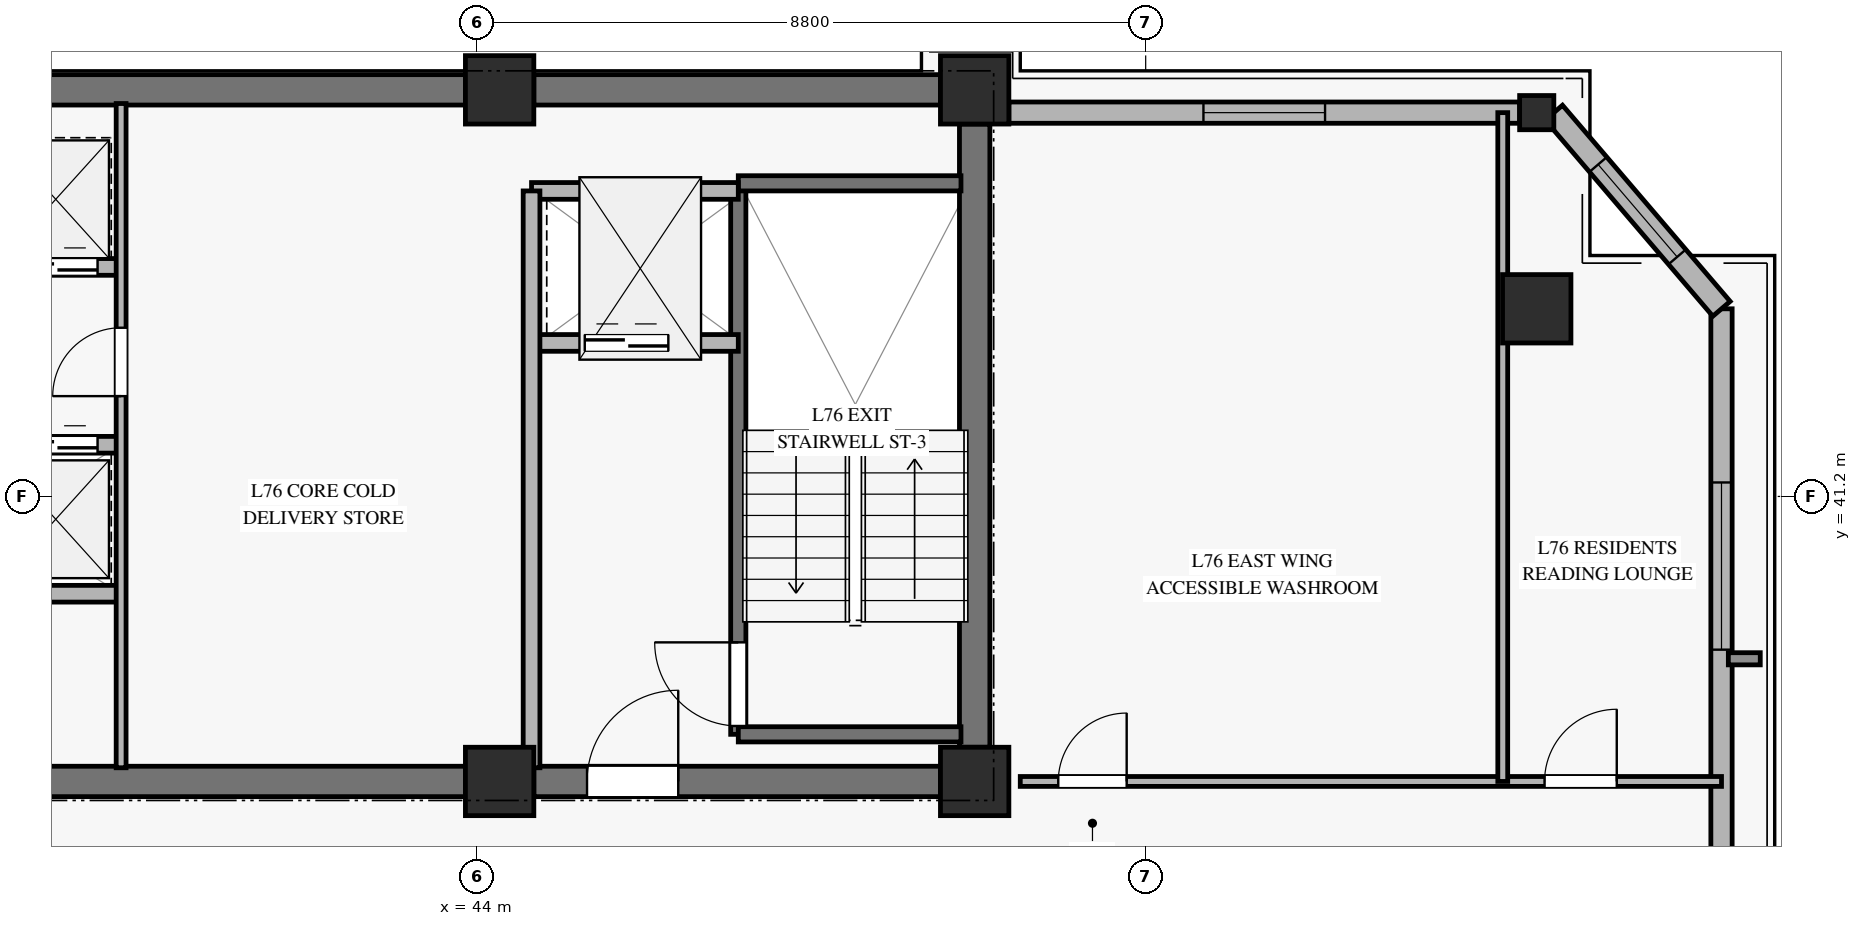
"""IFC4 building model, lengths in metres.
Left out: names, types, materials, properties, quantities, classifications, styles, units other than length and angle.
Written with IfcOpenShell. Run it as: python <this file> out.ifc"""

import sys

from ifc_helpers import new_model, si_unit, direction, frame, frame_2d, origin, origin_2d, place, context, subcontext, project, spatial, rectangle, hollow_rectangle, extrude, source, transform, mapped, element, fill, save


model = new_model("IFC4")
c1 = context("Model", 3, precision=1e-05, world=origin(), true_north=direction((0.0, 1.0)))
c2 = subcontext(c1, "Body", "Model", "MODEL_VIEW")
j1 = project(units=[si_unit("LENGTHUNIT", "METRE"), si_unit("PLANEANGLEUNIT", "RADIAN")], contexts=[c1])
p1 = place(None, origin())
s1 = spatial("IfcSite", under=j1, at=p1, CompositionType="ELEMENT")
p2 = place(p1, origin())
s2 = spatial("IfcBuilding", under=s1, at=p2, CompositionType="ELEMENT")
p3 = place(p2, frame((0.0, 0.0, 297.2)))
s3 = spatial("IfcBuildingStorey", under=s2, at=p3, CompositionType="ELEMENT", Elevation=297.2)
m1 = source(origin(), c2, "Body", "SweptSolid", [
    extrude(rectangle(XDim=0.9, YDim=0.9, at=origin_2d()), origin(), (0.0, 0.0, 1.0), 3.185),
])
for number, where, z_axis, x_axis in (
    (1, (44.3, 37.45, 0.0), (0.0, 0.0, 1.0), (1.0, 0.0, 0.0)),
    (2, (44.3, 46.55, 0.0), (0.0, 0.0, 1.0), (1.0, 0.0, 0.0)),
    (3, (50.55, 37.45, 0.0), (0.0, 0.0, 1.0), (1.0, 0.0, 0.0)),
    (4, (50.55, 46.55, 0.0), (0.0, 0.0, 1.0), (1.0, 0.0, 0.0)),
):
    element("IfcColumn", number, at=place(p3, frame(where, z_axis=z_axis, x_axis=x_axis)), inside=s3, PredefinedType="PILASTER", context=c2, shape_type="MappedRepresentation", body=[
        mapped(m1, transform((0.0, 0.0, 0.0), x_axis=(1.0, 0.0, 0.0), y_axis=(0.0, 1.0, 0.0), z_axis=(0.0, 0.0, 1.0), scale=1.0)),
    ])
p4 = place(p3, frame((36.05, 46.55, 0.0), z_axis=(0.0, 0.0, 1.0), x_axis=(1.0, 0.0, 0.0)))
e5 = element("IfcWall", 5, at=p4, inside=s3, PredefinedType="SHEAR", context=c2, shape_type="SweptSolid", body=[
    extrude(rectangle(XDim=7.8, YDim=0.4, at=frame_2d((3.9, 0.0))), origin(), (0.0, 0.0, 1.0), 3.185),
])
p5 = place(p3, frame((44.75, 46.55, 0.0), z_axis=(0.0, 0.0, 1.0), x_axis=(1.0, 0.0, 0.0)))
e6 = element("IfcWall", 6, at=p5, inside=s3, PredefinedType="SHEAR", context=c2, shape_type="SweptSolid", body=[
    extrude(rectangle(XDim=5.35, YDim=0.4, at=frame_2d((2.675, 0.0))), origin(), (0.0, 0.0, 1.0), 3.185),
])
p6 = place(p3, frame((36.05, 37.45, 0.0), z_axis=(0.0, 0.0, 1.0), x_axis=(1.0, 0.0, 0.0)))
e7 = element("IfcWall", 7, at=p6, inside=s3, PredefinedType="SHEAR", context=c2, shape_type="SweptSolid", body=[
    extrude(rectangle(XDim=7.8, YDim=0.4, at=frame_2d((3.9, 0.0))), origin(), (0.0, 0.0, 1.0), 3.185),
])
p7 = place(p3, frame((44.75, 37.45, 0.0), z_axis=(0.0, 0.0, 1.0), x_axis=(1.0, 0.0, 0.0)))
e8 = element("IfcWall", 8, at=p7, inside=s3, PredefinedType="SHEAR", context=c2, shape_type="SweptSolid", body=[
    extrude(rectangle(XDim=5.35, YDim=0.4, at=frame_2d((2.675, 0.0))), origin(), (0.0, 0.0, 1.0), 3.185),
])
p8 = place(p7, frame((0.7, 0.0, 0.0)))
e9 = element("IfcOpeningElement", 9, at=p8, cuts=e8, PredefinedType="OPENING", context=c2, shape_type="SweptSolid", body=[
    extrude(rectangle(XDim=1.2, YDim=2.15, at=frame_2d((0.6, 1.075))), frame((0.0, 0.21, 0.0), z_axis=(0.0, -1.0, 0.0), x_axis=(1.0, 0.0, 0.0)), (0.0, 0.0, 1.0), 0.42),
])
p9 = place(p3, frame((50.55, 37.9, 0.0), z_axis=(0.0, 0.0, 1.0), x_axis=(0.0, 1.0, 0.0)))
e10 = element("IfcWall", 10, at=p9, inside=s3, PredefinedType="SHEAR", context=c2, shape_type="SweptSolid", body=[
    extrude(rectangle(XDim=8.2, YDim=0.4, at=frame_2d((4.1, 0.0))), origin(), (0.0, 0.0, 1.0), 3.185),
])
m2 = source(origin(), c2, "Body", "SweptSolid", [
    extrude(hollow_rectangle(XDim=0.9, YDim=0.9, WallThickness=0.04, at=origin_2d()), origin(), (0.0, 0.0, 1.0), 3.185),
])
p10 = place(p3, frame((57.945, 43.669, 0.0), z_axis=(0.0, 0.0, 1.0), x_axis=(1.0, 0.0, 0.0)))
e11 = element("IfcColumn", 11, at=p10, inside=s3, PredefinedType="COLUMN", context=c2, shape_type="MappedRepresentation", body=[
    mapped(m2, transform((0.0, 0.0, 0.0), x_axis=(1.0, 0.0, 0.0), y_axis=(0.0, 1.0, 0.0), z_axis=(0.0, 0.0, 1.0), scale=1.0)),
])
m3 = source(origin(), c2, "Body", "SweptSolid", [
    extrude(hollow_rectangle(XDim=0.45, YDim=0.45, WallThickness=0.022, at=origin_2d()), origin(), (0.0, 0.0, 1.0), 3.185),
])
p11 = place(p3, frame((57.945, 46.25, 0.0), z_axis=(0.0, 0.0, 1.0), x_axis=(1.0, 0.0, 0.0)))
e12 = element("IfcColumn", 12, at=p11, inside=s3, PredefinedType="COLUMN", context=c2, shape_type="MappedRepresentation", body=[
    mapped(m3, transform((0.0, 0.0, 0.0), x_axis=(1.0, 0.0, 0.0), y_axis=(0.0, 1.0, 0.0), z_axis=(0.0, 0.0, 1.0), scale=1.0)),
])
p12 = place(p3, frame((60.376, 32.696, 0.0), z_axis=(0.0, 0.0, 1.0), x_axis=(0.0, 1.0, 0.0)))
e13 = element("IfcWall", 13, at=p12, inside=s3, PredefinedType="SOLIDWALL", context=c2, shape_type="SweptSolid", body=[
    extrude(rectangle(XDim=10.973, YDim=0.28, at=frame_2d((5.486, 0.0))), origin(), (0.0, 0.0, 1.0), 2.815),
])
p13 = place(p12, frame((6.488, 0.0, 0.45)))
e14 = element("IfcOpeningElement", 14, at=p13, cuts=e13, PredefinedType="OPENING", context=c2, shape_type="SweptSolid", body=[
    extrude(rectangle(XDim=2.2, YDim=2.1, at=frame_2d((1.1, 1.05))), frame((0.0, 0.15, 0.0), z_axis=(0.0, -1.0, 0.0), x_axis=(1.0, 0.0, 0.0)), (0.0, 0.0, 1.0), 0.3),
])
p14 = place(p3, frame((51.0, 46.25, 0.0), z_axis=(0.0, 0.0, 1.0), x_axis=(1.0, 0.0, 0.0)))
e15 = element("IfcWall", 15, at=p14, inside=s3, PredefinedType="SOLIDWALL", context=c2, shape_type="SweptSolid", body=[
    extrude(rectangle(XDim=6.72, YDim=0.28, at=frame_2d((3.36, 0.0))), origin(), (0.0, 0.0, 1.0), 2.815),
])
p15 = place(p14, frame((2.56, 0.0, 0.45)))
e16 = element("IfcOpeningElement", 16, at=p15, cuts=e15, PredefinedType="OPENING", context=c2, shape_type="SweptSolid", body=[
    extrude(rectangle(XDim=1.6, YDim=2.0, at=frame_2d((0.8, 1.0))), frame((0.0, 0.15, 0.0), z_axis=(0.0, -1.0, 0.0), x_axis=(1.0, 0.0, 0.0)), (0.0, 0.0, 1.0), 0.3),
])
p16 = place(p3, frame((60.376, 43.669, 0.0), z_axis=(0.0, 0.0, 1.0), x_axis=(-0.649724860602, 0.76016945842, 0.0)))
e17 = element("IfcWall", 17, at=p16, inside=s3, PredefinedType="SOLIDWALL", context=c2, shape_type="SweptSolid", body=[
    extrude(rectangle(XDim=3.395, YDim=0.3, at=frame_2d((1.698, 0.0))), origin(), (0.0, 0.0, 1.0), 2.815),
])
p17 = place(p16, frame((0.898, 0.0, 0.45)))
e18 = element("IfcOpeningElement", 18, at=p17, cuts=e17, PredefinedType="OPENING", context=c2, shape_type="SweptSolid", body=[
    extrude(rectangle(XDim=1.6, YDim=2.0, at=frame_2d((0.8, 1.0))), frame((0.0, 0.16, 0.0), z_axis=(0.0, -1.0, 0.0), x_axis=(1.0, 0.0, 0.0)), (0.0, 0.0, 1.0), 0.32),
])
p18 = place(p3, frame((47.44, 38.07, 0.0), z_axis=(0.0, 0.0, 1.0), x_axis=(0.0, 1.0, 0.0)))
e19 = element("IfcWall", 19, at=p18, inside=s3, PredefinedType="SOLIDWALL", context=c2, shape_type="SweptSolid", body=[
    extrude(rectangle(XDim=7.25, YDim=0.2, at=frame_2d((3.625, 0.0))), origin(), (0.0, 0.0, 1.0), 3.4),
])
p19 = place(p18, frame((0.11, 0.0, 0.0)))
e20 = element("IfcOpeningElement", 20, at=p19, cuts=e19, PredefinedType="OPENING", context=c2, shape_type="SweptSolid", body=[
    extrude(rectangle(XDim=1.1, YDim=2.15, at=frame_2d((0.55, 1.075))), frame((0.0, 0.11, 0.0), z_axis=(0.0, -1.0, 0.0), x_axis=(1.0, 0.0, 0.0)), (0.0, 0.0, 1.0), 0.22),
])
for number, where, z_axis, x_axis in (
    (21, (47.44, 45.32, 0.0), (0.0, 0.0, 1.0), (1.0, 0.0, 0.0)),
    (22, (47.44, 38.07, 0.0), (0.0, 0.0, 1.0), (1.0, 0.0, 0.0)),
):
    element("IfcWall", number, at=place(p3, frame(where, z_axis=z_axis, x_axis=x_axis)), inside=s3, PredefinedType="SOLIDWALL", context=c2, shape_type="SweptSolid", body=[
        extrude(rectangle(XDim=2.93, YDim=0.2, at=frame_2d((1.465, 0.0))), origin(), (0.0, 0.0, 1.0), 3.4),
    ])
p20 = place(p3, frame((44.72, 43.22, 0.0), z_axis=(0.0, 0.0, 1.0), x_axis=(1.0, 0.0, 0.0)))
e23 = element("IfcWall", 23, at=p20, inside=s3, PredefinedType="SOLIDWALL", context=c2, shape_type="SweptSolid", body=[
    extrude(rectangle(XDim=2.72, YDim=0.22, at=frame_2d((1.36, 0.0))), origin(), (0.0, 0.0, 1.0), 3.185),
])
p21 = place(p20, frame((0.7, 0.0, 0.0)))
e24 = element("IfcOpeningElement", 24, at=p21, cuts=e23, PredefinedType="OPENING", context=c2, shape_type="SweptSolid", body=[
    extrude(rectangle(XDim=1.1, YDim=2.2, at=frame_2d((0.55, 1.1))), frame((0.0, 0.12, 0.0), z_axis=(0.0, -1.0, 0.0), x_axis=(1.0, 0.0, 0.0)), (0.0, 0.0, 1.0), 0.24),
])
p22 = place(p3, frame((44.72, 45.22, 0.0), z_axis=(0.0, 0.0, 1.0), x_axis=(1.0, 0.0, 0.0)))
e25 = element("IfcWall", 25, at=p22, inside=s3, PredefinedType="SOLIDWALL", context=c2, shape_type="SweptSolid", body=[
    extrude(rectangle(XDim=2.72, YDim=0.22, at=frame_2d((1.36, 0.0))), origin(), (0.0, 0.0, 1.0), 3.185),
])
p23 = place(p3, frame((44.72, 37.63, 0.0), z_axis=(0.0, 0.0, 1.0), x_axis=(0.0, 1.0, 0.0)))
e26 = element("IfcWall", 26, at=p23, inside=s3, PredefinedType="SOLIDWALL", context=c2, shape_type="SweptSolid", body=[
    extrude(rectangle(XDim=7.59, YDim=0.22, at=frame_2d((3.795, 0.0))), origin(), (0.0, 0.0, 1.0), 3.185),
])
p24 = place(p3, frame((36.12, 44.22, 0.0), z_axis=(0.0, 0.0, 1.0), x_axis=(1.0, 0.0, 0.0)))
e27 = element("IfcWall", 27, at=p24, inside=s3, PredefinedType="SOLIDWALL", context=c2, shape_type="SweptSolid", body=[
    extrude(rectangle(XDim=3.2, YDim=0.22, at=frame_2d((1.6, 0.0))), origin(), (0.0, 0.0, 1.0), 3.185),
])
p25 = place(p24, frame((0.3, 0.0, 0.0)))
e28 = element("IfcOpeningElement", 28, at=p25, cuts=e27, PredefinedType="OPENING", context=c2, shape_type="SweptSolid", body=[
    extrude(rectangle(XDim=1.1, YDim=2.2, at=frame_2d((0.55, 1.1))), frame((0.0, 0.12, 0.0), z_axis=(0.0, -1.0, 0.0), x_axis=(1.0, 0.0, 0.0)), (0.0, 0.0, 1.0), 0.24),
])
p26 = place(p24, frame((1.79, 0.0, 0.0)))
e29 = element("IfcOpeningElement", 29, at=p26, cuts=e27, PredefinedType="OPENING", context=c2, shape_type="SweptSolid", body=[
    extrude(rectangle(XDim=1.1, YDim=2.2, at=frame_2d((0.55, 1.1))), frame((0.0, 0.12, 0.0), z_axis=(0.0, -1.0, 0.0), x_axis=(1.0, 0.0, 0.0)), (0.0, 0.0, 1.0), 0.24),
])
p27 = place(p3, frame((36.12, 41.88, 0.0), z_axis=(0.0, 0.0, 1.0), x_axis=(1.0, 0.0, 0.0)))
e30 = element("IfcWall", 30, at=p27, inside=s3, PredefinedType="SOLIDWALL", context=c2, shape_type="SweptSolid", body=[
    extrude(rectangle(XDim=3.2, YDim=0.22, at=frame_2d((1.6, 0.0))), origin(), (0.0, 0.0, 1.0), 3.185),
])
p28 = place(p27, frame((0.3, 0.0, 0.0)))
e31 = element("IfcOpeningElement", 31, at=p28, cuts=e30, PredefinedType="OPENING", context=c2, shape_type="SweptSolid", body=[
    extrude(rectangle(XDim=1.1, YDim=2.2, at=frame_2d((0.55, 1.1))), frame((0.0, 0.12, 0.0), z_axis=(0.0, -1.0, 0.0), x_axis=(1.0, 0.0, 0.0)), (0.0, 0.0, 1.0), 0.24),
])
p29 = place(p27, frame((1.79, 0.0, 0.0)))
e32 = element("IfcOpeningElement", 32, at=p29, cuts=e30, PredefinedType="OPENING", context=c2, shape_type="SweptSolid", body=[
    extrude(rectangle(XDim=1.1, YDim=2.2, at=frame_2d((0.55, 1.1))), frame((0.0, 0.12, 0.0), z_axis=(0.0, -1.0, 0.0), x_axis=(1.0, 0.0, 0.0)), (0.0, 0.0, 1.0), 0.24),
])
p30 = place(p3, frame((36.12, 39.92, 0.0), z_axis=(0.0, 0.0, 1.0), x_axis=(1.0, 0.0, 0.0)))
e33 = element("IfcWall", 33, at=p30, inside=s3, PredefinedType="SOLIDWALL", context=c2, shape_type="SweptSolid", body=[
    extrude(rectangle(XDim=3.2, YDim=0.22, at=frame_2d((1.6, 0.0))), origin(), (0.0, 0.0, 1.0), 3.185),
])
p31 = place(p3, frame((39.32, 37.63, 0.0), z_axis=(0.0, 0.0, 1.0), x_axis=(0.0, 1.0, 0.0)))
e34 = element("IfcWall", 34, at=p31, inside=s3, PredefinedType="PARTITIONING", context=c2, shape_type="SweptSolid", body=[
    extrude(rectangle(XDim=8.74, YDim=0.13, at=frame_2d((4.37, 0.0))), origin(), (0.0, 0.0, 1.0), 3.185),
])
p32 = place(p31, frame((4.89, 0.0, 0.0)))
e35 = element("IfcOpeningElement", 35, at=p32, cuts=e34, PredefinedType="OPENING", context=c2, shape_type="SweptSolid", body=[
    extrude(rectangle(XDim=0.9, YDim=2.1, at=frame_2d((0.45, 1.05))), frame((0.0, 0.075, 0.0), z_axis=(0.0, -1.0, 0.0), x_axis=(1.0, 0.0, 0.0)), (0.0, 0.0, 1.0), 0.15),
])
p33 = place(p3, frame((51.15, 37.45, 0.0), z_axis=(0.0, 0.0, 1.0), x_axis=(1.0, 0.0, 0.0)))
e36 = element("IfcWall", 36, at=p33, inside=s3, PredefinedType="PARTITIONING", context=c2, shape_type="SweptSolid", body=[
    extrude(rectangle(XDim=9.226, YDim=0.13, at=frame_2d((4.613, 0.0))), origin(), (0.0, 0.0, 1.0), 2.82),
])
p34 = place(p33, frame((0.5, 0.0, 0.0)))
e37 = element("IfcOpeningElement", 37, at=p34, cuts=e36, PredefinedType="OPENING", context=c2, shape_type="SweptSolid", body=[
    extrude(rectangle(XDim=0.9, YDim=2.1, at=frame_2d((0.45, 1.05))), frame((0.0, 0.075, 0.0), z_axis=(0.0, -1.0, 0.0), x_axis=(1.0, 0.0, 0.0)), (0.0, 0.0, 1.0), 0.15),
])
p35 = place(p33, frame((6.898, 0.0, 0.0)))
e38 = element("IfcOpeningElement", 38, at=p35, cuts=e36, PredefinedType="OPENING", context=c2, shape_type="SweptSolid", body=[
    extrude(rectangle(XDim=0.95, YDim=2.1, at=frame_2d((0.475, 1.05))), frame((0.0, 0.075, 0.0), z_axis=(0.0, -1.0, 0.0), x_axis=(1.0, 0.0, 0.0)), (0.0, 0.0, 1.0), 0.15),
])
p36 = place(p3, frame((57.498, 37.45, 0.0), z_axis=(0.0, 0.0, 1.0), x_axis=(0.0, 1.0, 0.0)))
e39 = element("IfcWall", 39, at=p36, inside=s3, PredefinedType="PARTITIONING", context=c2, shape_type="SweptSolid", body=[
    extrude(rectangle(XDim=8.8, YDim=0.13, at=frame_2d((4.4, 0.0))), origin(), (0.0, 0.0, 1.0), 2.82),
])
m4 = source(origin(), c2, "Body", "SweptSolid", [
    extrude(rectangle(XDim=2.2, YDim=2.1, at=frame_2d((1.1, 1.05))), frame((0.0, 0.03, 0.0), z_axis=(0.0, -1.0, 0.0), x_axis=(1.0, 0.0, 0.0)), (0.0, 0.0, 1.0), 0.06),
])
p37 = place(p13, origin())
e40 = element("IfcWindow", 40, at=p37, inside=s3, PartitioningType="SINGLE_PANEL", PredefinedType="WINDOW", context=c2, shape_type="MappedRepresentation", body=[
    mapped(m4, transform((0.0, 0.0, 0.0), x_axis=(1.0, 0.0, 0.0), y_axis=(0.0, 1.0, 0.0), z_axis=(0.0, 0.0, 1.0), scale=1.0)),
])
fill(e14, e40)
m5 = source(origin(), c2, "Body", "SweptSolid", [
    extrude(rectangle(XDim=1.6, YDim=2.0, at=frame_2d((0.8, 1.0))), frame((0.0, 0.03, 0.0), z_axis=(0.0, -1.0, 0.0), x_axis=(1.0, 0.0, 0.0)), (0.0, 0.0, 1.0), 0.06),
])
p38 = place(p15, origin())
e41 = element("IfcWindow", 41, at=p38, inside=s3, PartitioningType="SINGLE_PANEL", PredefinedType="WINDOW", context=c2, shape_type="MappedRepresentation", body=[
    mapped(m5, transform((0.0, 0.0, 0.0), x_axis=(1.0, 0.0, 0.0), y_axis=(0.0, 1.0, 0.0), z_axis=(0.0, 0.0, 1.0), scale=1.0)),
])
fill(e16, e41)
p39 = place(p17, origin())
e42 = element("IfcWindow", 42, at=p39, inside=s3, PartitioningType="SINGLE_PANEL", PredefinedType="WINDOW", context=c2, shape_type="MappedRepresentation", body=[
    mapped(m5, transform((0.0, 0.0, 0.0), x_axis=(1.0, 0.0, 0.0), y_axis=(0.0, 1.0, 0.0), z_axis=(0.0, 0.0, 1.0), scale=1.0)),
])
fill(e18, e42)
m6 = source(origin(), c2, "Body", "SweptSolid", [
    extrude(rectangle(XDim=1.1, YDim=2.15, at=frame_2d((0.55, 1.075))), frame((0.0, 0.025, 0.0), z_axis=(0.0, -1.0, 0.0), x_axis=(1.0, 0.0, 0.0)), (0.0, 0.0, 1.0), 0.05),
])
p40 = place(p19, origin())
e43 = element("IfcDoor", 43, at=p40, inside=s3, OperationType="SINGLE_SWING_RIGHT", PredefinedType="DOOR", context=c2, shape_type="MappedRepresentation", body=[
    mapped(m6, transform((0.0, 0.0, 0.0), x_axis=(1.0, 0.0, 0.0), y_axis=(0.0, 1.0, 0.0), z_axis=(0.0, 0.0, 1.0), scale=1.0)),
])
fill(e20, e43)
m7 = source(origin(), c2, "Body", "SweptSolid", [
    extrude(rectangle(XDim=1.1, YDim=2.2, at=frame_2d((0.55, 1.1))), frame((0.0, 0.025, 0.0), z_axis=(0.0, -1.0, 0.0), x_axis=(1.0, 0.0, 0.0)), (0.0, 0.0, 1.0), 0.05),
])
p41 = place(p21, origin())
e44 = element("IfcDoor", 44, at=p41, inside=s3, OperationType="SLIDING_TO_LEFT", PredefinedType="DOOR", context=c2, shape_type="MappedRepresentation", body=[
    mapped(m7, transform((0.0, 0.0, 0.0), x_axis=(1.0, 0.0, 0.0), y_axis=(0.0, 1.0, 0.0), z_axis=(0.0, 0.0, 1.0), scale=1.0)),
])
fill(e24, e44)
m8 = source(origin(), c2, "Body", "SweptSolid", [
    extrude(rectangle(XDim=1.2, YDim=2.15, at=frame_2d((0.6, 1.075))), frame((0.0, 0.025, 0.0), z_axis=(0.0, -1.0, 0.0), x_axis=(1.0, 0.0, 0.0)), (0.0, 0.0, 1.0), 0.05),
])
p42 = place(p8, origin())
e45 = element("IfcDoor", 45, at=p42, inside=s3, OperationType="SINGLE_SWING_RIGHT", PredefinedType="DOOR", context=c2, shape_type="MappedRepresentation", body=[
    mapped(m8, transform((0.0, 0.0, 0.0), x_axis=(1.0, 0.0, 0.0), y_axis=(0.0, 1.0, 0.0), z_axis=(0.0, 0.0, 1.0), scale=1.0)),
])
fill(e9, e45)
p43 = place(p26, origin())
e46 = element("IfcDoor", 46, at=p43, inside=s3, OperationType="SLIDING_TO_LEFT", PredefinedType="DOOR", context=c2, shape_type="MappedRepresentation", body=[
    mapped(m7, transform((0.0, 0.0, 0.0), x_axis=(1.0, 0.0, 0.0), y_axis=(0.0, 1.0, 0.0), z_axis=(0.0, 0.0, 1.0), scale=1.0)),
])
fill(e29, e46)
p44 = place(p29, origin())
e47 = element("IfcDoor", 47, at=p44, inside=s3, OperationType="SLIDING_TO_LEFT", PredefinedType="DOOR", context=c2, shape_type="MappedRepresentation", body=[
    mapped(m7, transform((0.0, 0.0, 0.0), x_axis=(1.0, 0.0, 0.0), y_axis=(0.0, 1.0, 0.0), z_axis=(0.0, 0.0, 1.0), scale=1.0)),
])
fill(e32, e47)
m9 = source(origin(), c2, "Body", "SweptSolid", [
    extrude(rectangle(XDim=0.9, YDim=2.1, at=frame_2d((0.45, 1.05))), frame((0.0, 0.025, 0.0), z_axis=(0.0, -1.0, 0.0), x_axis=(1.0, 0.0, 0.0)), (0.0, 0.0, 1.0), 0.05),
])
p45 = place(p32, origin())
e48 = element("IfcDoor", 48, at=p45, inside=s3, OperationType="SINGLE_SWING_LEFT", PredefinedType="DOOR", context=c2, shape_type="MappedRepresentation", body=[
    mapped(m9, transform((0.0, 0.0, 0.0), x_axis=(1.0, 0.0, 0.0), y_axis=(0.0, 1.0, 0.0), z_axis=(0.0, 0.0, 1.0), scale=1.0)),
])
fill(e35, e48)
p46 = place(p34, origin())
e49 = element("IfcDoor", 49, at=p46, inside=s3, OperationType="SINGLE_SWING_RIGHT", PredefinedType="DOOR", context=c2, shape_type="MappedRepresentation", body=[
    mapped(m9, transform((0.0, 0.0, 0.0), x_axis=(1.0, 0.0, 0.0), y_axis=(0.0, 1.0, 0.0), z_axis=(0.0, 0.0, 1.0), scale=1.0)),
])
fill(e37, e49)
m10 = source(origin(), c2, "Body", "SweptSolid", [
    extrude(rectangle(XDim=0.95, YDim=2.1, at=frame_2d((0.475, 1.05))), frame((0.0, 0.025, 0.0), z_axis=(0.0, -1.0, 0.0), x_axis=(1.0, 0.0, 0.0)), (0.0, 0.0, 1.0), 0.05),
])
p47 = place(p35, origin())
e50 = element("IfcDoor", 50, at=p47, inside=s3, OperationType="SINGLE_SWING_RIGHT", PredefinedType="DOOR", context=c2, shape_type="MappedRepresentation", body=[
    mapped(m10, transform((0.0, 0.0, 0.0), x_axis=(1.0, 0.0, 0.0), y_axis=(0.0, 1.0, 0.0), z_axis=(0.0, 0.0, 1.0), scale=1.0)),
])
fill(e38, e50)
save(model, sys.argv[1])
